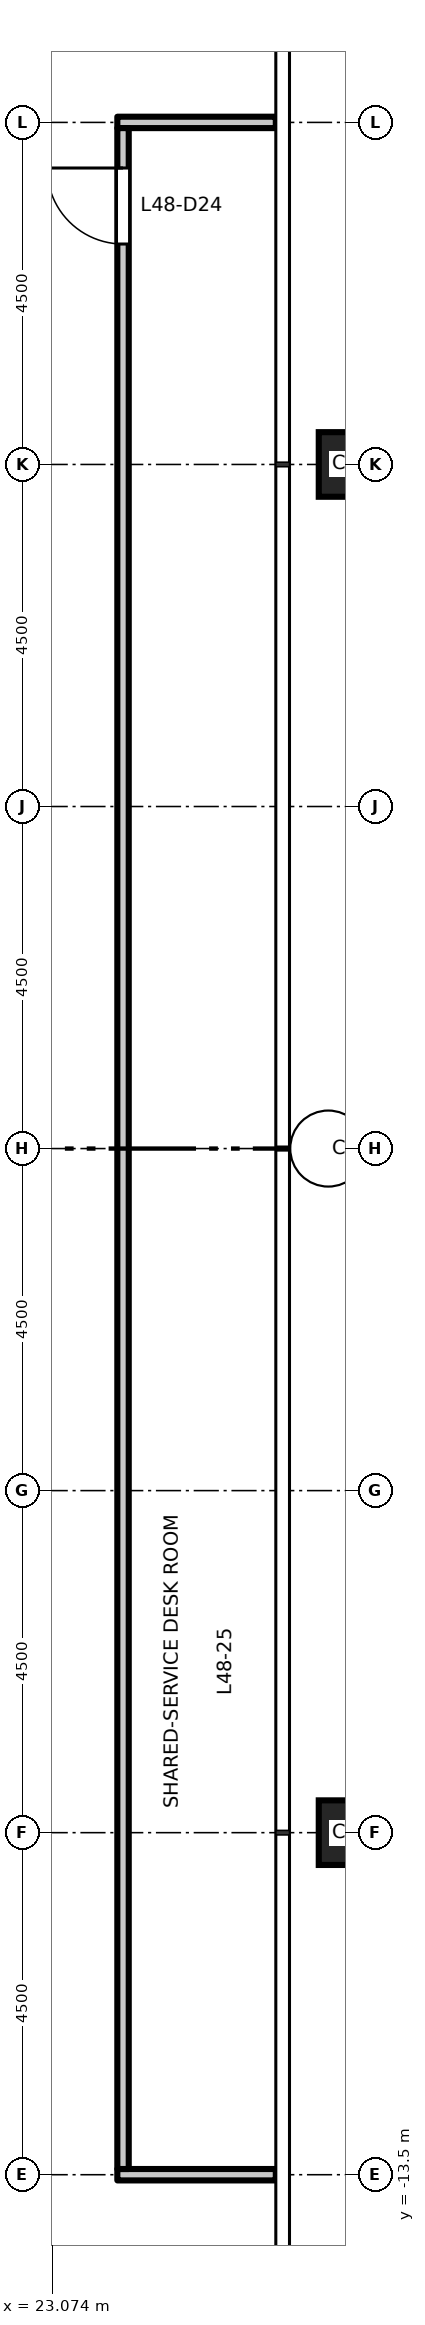
"""IFC4 building model, lengths in metres.
Left out: names, types, materials, properties, quantities, classifications, styles, units other than length and angle.
Written with IfcOpenShell. Run it as: python <this file> out.ifc"""

import sys

from ifc_helpers import new_model, si_unit, direction, frame, frame_2d, origin, origin_2d, place, context, subcontext, project, spatial, rectangle, hollow_rectangle, extrude, element, fill, save


model = new_model("IFC4")
c1 = context("Model", 3, precision=1e-05, world=origin(), true_north=direction((0.0, 1.0)))
c2 = subcontext(c1, "Body", "Model", "MODEL_VIEW")
j1 = project(units=[si_unit("LENGTHUNIT", "METRE"), si_unit("PLANEANGLEUNIT", "RADIAN")], contexts=[c1])
p1 = place(None, origin())
s1 = spatial("IfcSite", under=j1, at=p1, CompositionType="ELEMENT")
p2 = place(p1, origin())
s2 = spatial("IfcBuilding", under=s1, at=p2, CompositionType="ELEMENT")
p3 = place(p2, frame((0.0, 0.0, 224.2)))
s3 = spatial("IfcBuildingStorey", under=s2, at=p3, CompositionType="ELEMENT", Elevation=224.2)
for number, where, z_axis, x_axis in (
    (1, (27.0, -9.0, 0.0), (0.0, 0.0, 1.0), (1.0, 0.0, 0.0)),
    (2, (27.0, 0.0, 0.0), (0.0, 0.0, 1.0), (1.0, 0.0, 0.0)),
    (3, (27.0, 9.0, 0.0), (0.0, 0.0, 1.0), (1.0, 0.0, 0.0)),
):
    element("IfcColumn", number, at=place(p3, frame(where, z_axis=z_axis, x_axis=x_axis)), inside=s3, PredefinedType="COLUMN", context=c2, shape_type="SweptSolid", body=[
        extrude(hollow_rectangle(XDim=0.85, YDim=0.85, WallThickness=0.05, at=origin_2d()), origin(), (0.0, 0.0, 1.0), 4.5),
    ])
p4 = place(p3, frame((23.925, -13.5, 0.0), z_axis=(0.0, 0.0, 1.0), x_axis=(1.0, 0.0, 0.0)))
e4 = element("IfcWall", 4, at=p4, inside=s3, PredefinedType="PARTITIONING", context=c2, shape_type="SweptSolid", body=[
    extrude(rectangle(XDim=2.085, YDim=0.15, at=frame_2d((1.042, 0.0))), origin(), (0.0, 0.0, 1.0), 3.95),
])
p5 = place(p3, frame((23.925, 13.5, 0.0), z_axis=(0.0, 0.0, 1.0), x_axis=(1.0, 0.0, 0.0)))
e5 = element("IfcWall", 5, at=p5, inside=s3, PredefinedType="PARTITIONING", context=c2, shape_type="SweptSolid", body=[
    extrude(rectangle(XDim=2.085, YDim=0.15, at=frame_2d((1.042, 0.0))), origin(), (0.0, 0.0, 1.0), 4.35),
])
p6 = place(p3, frame((24.0, -13.425, 0.0), z_axis=(0.0, 0.0, 1.0), x_axis=(0.0, 1.0, 0.0)))
e6 = element("IfcWall", 6, at=p6, inside=s3, PredefinedType="PARTITIONING", context=c2, shape_type="SweptSolid", body=[
    extrude(rectangle(XDim=26.85, YDim=0.15, at=frame_2d((13.425, 0.0))), origin(), (0.0, 0.0, 1.0), 4.35),
])
p7 = place(p6, frame((25.325, 0.0, 0.0)))
e7 = element("IfcOpeningElement", 7, at=p7, cuts=e6, PredefinedType="OPENING", context=c2, shape_type="SweptSolid", body=[
    extrude(rectangle(XDim=1.0, YDim=2.1, at=frame_2d((0.5, 1.05))), frame((0.0, 0.085, 0.0), z_axis=(0.0, -1.0, 0.0), x_axis=(1.0, 0.0, 0.0)), (0.0, 0.0, 1.0), 0.17),
])
p8 = place(p7, origin())
e8 = element("IfcDoor", 8, at=p8, inside=s3, OperationType="SINGLE_SWING_RIGHT", PredefinedType="DOOR", context=c2, shape_type="SweptSolid", body=[
    extrude(rectangle(XDim=1.0, YDim=2.1, at=frame_2d((0.5, 1.05))), frame((0.0, 0.025, 0.0), z_axis=(0.0, -1.0, 0.0), x_axis=(1.0, 0.0, 0.0)), (0.0, 0.0, 1.0), 0.05),
])
fill(e7, e8)
save(model, sys.argv[1])
